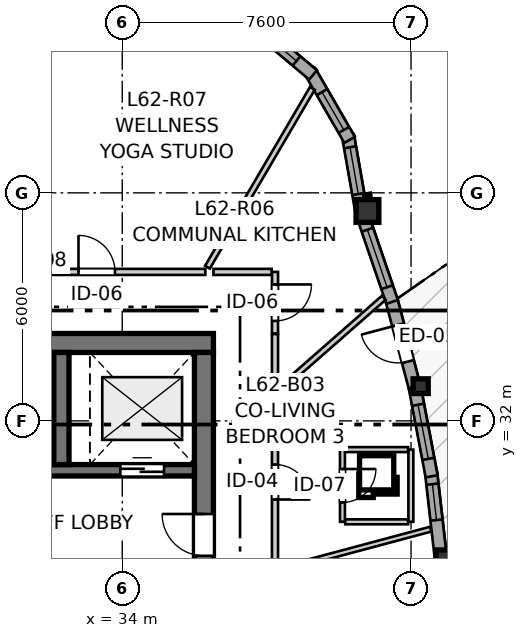
"""IFC4 building model, lengths in metres.
Left out: names, types, materials, properties, quantities, classifications, styles, units other than length and angle.
Written with IfcOpenShell. Run it as: python <this file> out.ifc"""

import sys

from ifc_helpers import new_model, si_unit, direction, frame, frame_2d, origin, origin_2d, place, context, subcontext, project, spatial, rectangle, i_section, extrude, source, transform, mapped, element, fill, save


model = new_model("IFC4")
c1 = context("Model", 3, precision=1e-05, world=origin(), true_north=direction((0.0, 1.0)))
c2 = subcontext(c1, "Body", "Model", "MODEL_VIEW")
j1 = project(units=[si_unit("LENGTHUNIT", "METRE"), si_unit("PLANEANGLEUNIT", "RADIAN")], contexts=[c1])
p1 = place(None, origin())
s1 = spatial("IfcSite", under=j1, at=p1, CompositionType="ELEMENT")
p2 = place(p1, origin())
s2 = spatial("IfcBuilding", under=s1, at=p2, CompositionType="ELEMENT")
p3 = place(p2, frame((0.0, 0.0, 208.4)))
s3 = spatial("IfcBuildingStorey", under=s2, at=p3, CompositionType="ELEMENT", Elevation=208.4)
p4 = place(p3, frame((36.4, 34.05, 0.0), z_axis=(0.0, 0.0, 1.0), x_axis=(-1.0, 0.0, 0.0)))
e1 = element("IfcWall", 1, at=p4, inside=s3, PredefinedType="SHEAR", context=c2, shape_type="SweptSolid", body=[
    extrude(rectangle(XDim=12.1, YDim=0.5, at=frame_2d((6.05, 0.0))), origin(), (0.0, 0.0, 1.0), 2.935),
])
p5 = place(p3, frame((36.15, 18.2, 0.0), z_axis=(0.0, 0.0, 1.0), x_axis=(0.0, 1.0, 0.0)))
e2 = element("IfcWall", 2, at=p5, inside=s3, PredefinedType="SHEAR", context=c2, shape_type="SweptSolid", body=[
    extrude(rectangle(XDim=15.6, YDim=0.5, at=frame_2d((7.8, 0.0))), origin(), (0.0, 0.0, 1.0), 2.935),
])
p6 = place(p5, frame((4.25, 0.0, 0.0)))
e3 = element("IfcOpeningElement", 3, at=p6, cuts=e2, PredefinedType="OPENING", context=c2, shape_type="SweptSolid", body=[
    extrude(rectangle(XDim=1.1, YDim=2.15, at=frame_2d((0.55, 1.075))), frame((0.0, 0.26, 0.0), z_axis=(0.0, -1.0, 0.0), x_axis=(1.0, 0.0, 0.0)), (0.0, 0.0, 1.0), 0.52),
])
p7 = place(p5, frame((10.25, 0.0, 0.0)))
e4 = element("IfcOpeningElement", 4, at=p7, cuts=e2, PredefinedType="OPENING", context=c2, shape_type="SweptSolid", body=[
    extrude(rectangle(XDim=1.1, YDim=2.15, at=frame_2d((0.55, 1.075))), frame((0.0, 0.26, 0.0), z_axis=(0.0, -1.0, 0.0), x_axis=(1.0, 0.0, 0.0)), (0.0, 0.0, 1.0), 0.52),
])
p8 = place(p3, frame((24.8, 30.7, 0.0), z_axis=(0.0, 0.0, 1.0), x_axis=(1.0, 0.0, 0.0)))
e5 = element("IfcWall", 5, at=p8, inside=s3, PredefinedType="SHEAR", context=c2, shape_type="SweptSolid", body=[
    extrude(rectangle(XDim=11.1, YDim=0.3, at=frame_2d((5.55, 0.0))), origin(), (0.0, 0.0, 1.0), 2.935),
])
p9 = place(p8, frame((6.22, 0.0, 0.0)))
e6 = element("IfcOpeningElement", 6, at=p9, cuts=e5, PredefinedType="OPENING", context=c2, shape_type="SweptSolid", body=[
    extrude(rectangle(XDim=0.98, YDim=2.15, at=frame_2d((0.49, 1.075))), frame((0.0, 0.16, 0.0), z_axis=(0.0, -1.0, 0.0), x_axis=(1.0, 0.0, 0.0)), (0.0, 0.0, 1.0), 0.32),
])
p10 = place(p8, frame((9.15, 0.0, 0.0)))
e7 = element("IfcOpeningElement", 7, at=p10, cuts=e5, PredefinedType="OPENING", context=c2, shape_type="SweptSolid", body=[
    extrude(rectangle(XDim=1.15, YDim=2.15, at=frame_2d((0.575, 1.075))), frame((0.0, 0.16, 0.0), z_axis=(0.0, -1.0, 0.0), x_axis=(1.0, 0.0, 0.0)), (0.0, 0.0, 1.0), 0.32),
])
p11 = place(p3, frame((32.4, 30.85, 0.0), z_axis=(0.0, 0.0, 1.0), x_axis=(0.0, 1.0, 0.0)))
e8 = element("IfcWall", 8, at=p11, inside=s3, PredefinedType="SHEAR", context=c2, shape_type="SweptSolid", body=[
    extrude(rectangle(XDim=2.95, YDim=0.4, at=frame_2d((1.475, 0.0))), origin(), (0.0, 0.0, 1.0), 2.935),
])
m1 = source(origin(), c2, "Body", "SweptSolid", [
    extrude(rectangle(XDim=0.6, YDim=0.6, at=origin_2d()), origin(), (0.0, 0.0, 1.0), 2.935),
])
p12 = place(p3, frame((42.554, 28.304, 0.0), z_axis=(0.0, 0.0, 1.0), x_axis=(1.0, 0.0, 0.0)))
e9 = element("IfcColumn", 9, at=p12, inside=s3, PredefinedType="COLUMN", context=c2, shape_type="MappedRepresentation", body=[
    mapped(m1, transform((0.0, 0.0, 0.0), x_axis=(1.0, 0.0, 0.0), y_axis=(0.0, 1.0, 0.0), z_axis=(0.0, 0.0, 1.0), scale=1.0)),
])
m2 = source(origin(), c2, "Body", "SweptSolid", [
    extrude(i_section(OverallWidth=0.398, OverallDepth=0.387, WebThickness=0.019, FlangeThickness=0.03, FilletRadius=0.015, at=origin_2d()), origin(), (0.0, 0.0, 1.0), 2.935),
])
p13 = place(p3, frame((41.854, 32.914, 0.0), z_axis=(0.0, 0.0, 1.0), x_axis=(1.0, 0.0, 0.0)))
e10 = element("IfcColumn", 10, at=p13, inside=s3, PredefinedType="PILASTER", context=c2, shape_type="MappedRepresentation", body=[
    mapped(m2, transform((0.0, 0.0, 0.0), x_axis=(1.0, 0.0, 0.0), y_axis=(0.0, 1.0, 0.0), z_axis=(0.0, 0.0, 1.0), scale=1.0)),
])
p14 = place(p3, frame((40.452, 37.522, 0.0), z_axis=(0.0, 0.0, 1.0), x_axis=(1.0, 0.0, 0.0)))
e11 = element("IfcColumn", 11, at=p14, inside=s3, PredefinedType="COLUMN", context=c2, shape_type="MappedRepresentation", body=[
    mapped(m1, transform((0.0, 0.0, 0.0), x_axis=(1.0, 0.0, 0.0), y_axis=(0.0, 1.0, 0.0), z_axis=(0.0, 0.0, 1.0), scale=1.0)),
])
p15 = place(p3, frame((42.385, 28.376, 0.0), z_axis=(0.0, 0.0, 1.0), x_axis=(-0.113267221285, 0.993564560853, 0.0)))
e12 = element("IfcWall", 12, at=p15, inside=s3, PredefinedType="SOLIDWALL", context=c2, shape_type="SweptSolid", body=[
    extrude(rectangle(XDim=2.268, YDim=0.32, at=frame_2d((1.134, 0.0))), origin(), (0.0, 0.0, 1.0), 2.555),
])
p16 = place(p15, frame((1.021, 0.0, 0.82)))
e13 = element("IfcOpeningElement", 13, at=p16, cuts=e12, PredefinedType="OPENING", context=c2, shape_type="SweptSolid", body=[
    extrude(rectangle(XDim=0.95, YDim=1.35, at=frame_2d((0.475, 0.675))), frame((0.0, 0.17, 0.0), z_axis=(0.0, -1.0, 0.0), x_axis=(1.0, 0.0, 0.0)), (0.0, 0.0, 1.0), 0.34),
])
p17 = place(p3, frame((42.141, 30.542, 0.0), z_axis=(0.0, 0.0, 1.0), x_axis=(-0.186632734065, 0.982429754525, 0.0)))
e14 = element("IfcWall", 14, at=p17, inside=s3, PredefinedType="SOLIDWALL", context=c2, shape_type="SweptSolid", body=[
    extrude(rectangle(XDim=2.364, YDim=0.32, at=frame_2d((1.182, 0.0))), origin(), (0.0, 0.0, 1.0), 2.555),
])
p18 = place(p17, frame((0.467, 0.0, 0.82)))
e15 = element("IfcOpeningElement", 15, at=p18, cuts=e14, PredefinedType="OPENING", context=c2, shape_type="SweptSolid", body=[
    extrude(rectangle(XDim=1.45, YDim=1.25, at=frame_2d((0.725, 0.625))), frame((0.0, 0.17, 0.0), z_axis=(0.0, -1.0, 0.0), x_axis=(1.0, 0.0, 0.0)), (0.0, 0.0, 1.0), 0.34),
])
p19 = place(p3, frame((41.694, 32.892, 0.0), z_axis=(0.0, 0.0, 1.0), x_axis=(-0.257068132003, 0.966393282007, 0.0)))
e16 = element("IfcWall", 16, at=p19, inside=s3, PredefinedType="SOLIDWALL", context=c2, shape_type="SweptSolid", body=[
    extrude(rectangle(XDim=2.403, YDim=0.32, at=frame_2d((1.201, 0.0))), origin(), (0.0, 0.0, 1.0), 2.555),
])
p20 = place(p19, frame((0.691, 0.0, 0.0)))
e17 = element("IfcOpeningElement", 17, at=p20, cuts=e16, PredefinedType="OPENING", context=c2, shape_type="SweptSolid", body=[
    extrude(rectangle(XDim=1.0, YDim=2.1, at=frame_2d((0.5, 1.05))), frame((0.0, 0.17, 0.0), z_axis=(0.0, -1.0, 0.0), x_axis=(1.0, 0.0, 0.0)), (0.0, 0.0, 1.0), 0.34),
])
p21 = place(p3, frame((41.102, 35.13, 0.0), z_axis=(0.0, 0.0, 1.0), x_axis=(-0.323685265908, 0.946164810503, 0.0)))
e18 = element("IfcWall", 18, at=p21, inside=s3, PredefinedType="SOLIDWALL", context=c2, shape_type="SweptSolid", body=[
    extrude(rectangle(XDim=2.384, YDim=0.32, at=frame_2d((1.192, 0.0))), origin(), (0.0, 0.0, 1.0), 2.555),
])
p22 = place(p21, frame((0.408, 0.0, 0.82)))
e19 = element("IfcOpeningElement", 19, at=p22, cuts=e18, PredefinedType="OPENING", context=c2, shape_type="SweptSolid", body=[
    extrude(rectangle(XDim=1.6, YDim=1.35, at=frame_2d((0.8, 0.675))), frame((0.0, 0.17, 0.0), z_axis=(0.0, -1.0, 0.0), x_axis=(1.0, 0.0, 0.0)), (0.0, 0.0, 1.0), 0.34),
])
p23 = place(p3, frame((40.279, 37.583, 0.0), z_axis=(0.0, 0.0, 1.0), x_axis=(-0.173671780312, 0.984803590937, 0.0)))
e20 = element("IfcWall", 20, at=p23, inside=s3, PredefinedType="SOLIDWALL", context=c2, shape_type="SweptSolid", body=[
    extrude(rectangle(XDim=1.962, YDim=0.32, at=frame_2d((0.981, 0.0))), origin(), (0.0, 0.0, 1.0), 2.555),
])
p24 = place(p23, frame((0.391, 0.0, 0.82)))
e21 = element("IfcOpeningElement", 21, at=p24, cuts=e20, PredefinedType="OPENING", context=c2, shape_type="SweptSolid", body=[
    extrude(rectangle(XDim=1.25, YDim=1.35, at=frame_2d((0.625, 0.675))), frame((0.0, 0.17, 0.0), z_axis=(0.0, -1.0, 0.0), x_axis=(1.0, 0.0, 0.0)), (0.0, 0.0, 1.0), 0.34),
])
p25 = place(p3, frame((39.983, 39.393, 0.0), z_axis=(0.0, 0.0, 1.0), x_axis=(-0.499995423472, 0.866028046028, 0.0)))
e22 = element("IfcWall", 22, at=p25, inside=s3, PredefinedType="SOLIDWALL", context=c2, shape_type="SweptSolid", body=[
    extrude(rectangle(XDim=2.09, YDim=0.32, at=frame_2d((1.045, 0.0))), origin(), (0.0, 0.0, 1.0), 2.555),
])
p26 = place(p25, frame((0.303, 0.0, 0.82)))
e23 = element("IfcOpeningElement", 23, at=p26, cuts=e22, PredefinedType="OPENING", context=c2, shape_type="SweptSolid", body=[
    extrude(rectangle(XDim=1.15, YDim=1.2, at=frame_2d((0.575, 0.6))), frame((0.0, 0.17, 0.0), z_axis=(0.0, -1.0, 0.0), x_axis=(1.0, 0.0, 0.0)), (0.0, 0.0, 1.0), 0.34),
])
p27 = place(p3, frame((39.022, 41.104, 0.0), z_axis=(0.0, 0.0, 1.0), x_axis=(-0.766072824549, 0.642753784499, 0.0)))
e24 = element("IfcWall", 24, at=p27, inside=s3, PredefinedType="SOLIDWALL", context=c2, shape_type="SweptSolid", body=[
    extrude(rectangle(XDim=2.091, YDim=0.32, at=frame_2d((1.045, 0.0))), origin(), (0.0, 0.0, 1.0), 2.555),
])
p28 = place(p27, frame((0.57, 0.0, 0.82)))
e25 = element("IfcOpeningElement", 25, at=p28, cuts=e24, PredefinedType="OPENING", context=c2, shape_type="SweptSolid", body=[
    extrude(rectangle(XDim=0.95, YDim=1.35, at=frame_2d((0.475, 0.675))), frame((0.0, 0.17, 0.0), z_axis=(0.0, -1.0, 0.0), x_axis=(1.0, 0.0, 0.0)), (0.0, 0.0, 1.0), 0.34),
])
p29 = place(p3, frame((30.474, 35.92, 0.0), z_axis=(0.0, 0.0, 1.0), x_axis=(1.0, 0.0, 0.0)))
e26 = element("IfcWall", 26, at=p29, inside=s3, PredefinedType="PARTITIONING", context=c2, shape_type="SweptSolid", body=[
    extrude(rectangle(XDim=5.713, YDim=0.16, at=frame_2d((2.856, 0.0))), origin(), (0.0, 0.0, 1.0), 2.935),
])
p30 = place(p29, frame((2.375, 0.0, 0.0)))
e27 = element("IfcOpeningElement", 27, at=p30, cuts=e26, PredefinedType="OPENING", context=c2, shape_type="SweptSolid", body=[
    extrude(rectangle(XDim=0.96, YDim=2.1, at=frame_2d((0.48, 1.05))), frame((0.0, 0.09, 0.0), z_axis=(0.0, -1.0, 0.0), x_axis=(1.0, 0.0, 0.0)), (0.0, 0.0, 1.0), 0.18),
])
p31 = place(p3, frame((38.02, 32.748, 0.0), z_axis=(0.0, 0.0, 1.0), x_axis=(0.0, -1.0, 0.0)))
e28 = element("IfcWall", 28, at=p31, inside=s3, PredefinedType="PARTITIONING", context=c2, shape_type="SweptSolid", body=[
    extrude(rectangle(XDim=4.71, YDim=0.16, at=frame_2d((2.355, 0.0))), origin(), (0.0, 0.0, 1.0), 2.603),
])
p32 = place(p31, frame((1.897, 0.0, 0.0)))
e29 = element("IfcOpeningElement", 29, at=p32, cuts=e28, PredefinedType="OPENING", context=c2, shape_type="SweptSolid", body=[
    extrude(rectangle(XDim=0.92, YDim=2.1, at=frame_2d((0.46, 1.05))), frame((0.0, 0.09, 0.0), z_axis=(0.0, -1.0, 0.0), x_axis=(1.0, 0.0, 0.0)), (0.0, 0.0, 1.0), 0.18),
])
p33 = place(p3, frame((39.795, 31.244, 0.0), z_axis=(0.0, 0.0, 1.0), x_axis=(0.0, -1.0, 0.0)))
e30 = element("IfcWall", 30, at=p33, inside=s3, PredefinedType="PARTITIONING", context=c2, shape_type="SweptSolid", body=[
    extrude(rectangle(XDim=1.9, YDim=0.13, at=frame_2d((0.95, 0.0))), origin(), (0.0, 0.0, 1.0), 2.573),
])
p34 = place(p33, frame((0.51, 0.0, 0.0)))
e31 = element("IfcOpeningElement", 31, at=p34, cuts=e30, PredefinedType="OPENING", context=c2, shape_type="SweptSolid", body=[
    extrude(rectangle(XDim=0.88, YDim=2.05, at=frame_2d((0.44, 1.025))), frame((0.0, 0.075, 0.0), z_axis=(0.0, -1.0, 0.0), x_axis=(1.0, 0.0, 0.0)), (0.0, 0.0, 1.0), 0.15),
])
p35 = place(p3, frame((38.02, 35.92, 0.0), z_axis=(0.0, 0.0, 1.0), x_axis=(0.0, -1.0, 0.0)))
e32 = element("IfcWall", 32, at=p35, inside=s3, PredefinedType="PARTITIONING", context=c2, shape_type="SweptSolid", body=[
    extrude(rectangle(XDim=1.62, YDim=0.16, at=frame_2d((0.81, 0.0))), origin(), (0.0, 0.0, 1.0), 2.603),
])
p36 = place(p35, frame((0.33, 0.0, 0.0)))
e33 = element("IfcOpeningElement", 33, at=p36, cuts=e32, PredefinedType="OPENING", context=c2, shape_type="SweptSolid", body=[
    extrude(rectangle(XDim=0.96, YDim=2.1, at=frame_2d((0.48, 1.05))), frame((0.0, 0.09, 0.0), z_axis=(0.0, -1.0, 0.0), x_axis=(1.0, 0.0, 0.0)), (0.0, 0.0, 1.0), 0.18),
])
p37 = place(p3, frame((36.242, 36.044, 0.0), z_axis=(0.0, 0.0, 1.0), x_axis=(0.50599508157, 0.862536362959, 0.0)))
e34 = element("IfcWall", 34, at=p37, inside=s3, PredefinedType="PARTITIONING", context=c2, shape_type="SweptSolid", body=[
    extrude(rectangle(XDim=5.456, YDim=0.145, at=frame_2d((2.728, 0.0))), origin(), (0.0, 0.0, 1.0), 2.935),
])
p38 = place(p3, frame((38.125, 28.082, 0.0), z_axis=(0.0, 0.0, 1.0), x_axis=(0.965997321458, 0.258552073934, 0.0)))
e35 = element("IfcWall", 35, at=p38, inside=s3, PredefinedType="PARTITIONING", context=c2, shape_type="SweptSolid", body=[
    extrude(rectangle(XDim=4.134, YDim=0.13, at=frame_2d((2.067, 0.0))), origin(), (0.0, 0.0, 1.0), 2.935),
])
p39 = place(p3, frame((38.154, 32.845, 0.0), z_axis=(0.0, 0.0, 1.0), x_axis=(0.751793032372, 0.659399148071, 0.0)))
e36 = element("IfcWall", 36, at=p39, inside=s3, PredefinedType="PARTITIONING", context=c2, shape_type="SweptSolid", body=[
    extrude(rectangle(XDim=3.631, YDim=0.145, at=frame_2d((1.815, 0.0))), origin(), (0.0, 0.0, 1.0), 2.935),
])
p40 = place(p3, frame((41.595, 29.344, 0.0), z_axis=(0.0, 0.0, 1.0), x_axis=(0.0, 1.0, 0.0)))
e37 = element("IfcWall", 37, at=p40, inside=s3, PredefinedType="PARTITIONING", context=c2, shape_type="SweptSolid", body=[
    extrude(rectangle(XDim=1.9, YDim=0.13, at=frame_2d((0.95, 0.0))), origin(), (0.0, 0.0, 1.0), 2.935),
])
for number, where, z_axis, x_axis in (
    (38, (39.868, 31.244, 0.0), (0.0, 0.0, 1.0), (1.0, 0.0, 0.0)),
    (39, (39.868, 29.344, 0.0), (0.0, 0.0, 1.0), (1.0, 0.0, 0.0)),
):
    element("IfcWall", number, at=place(p3, frame(where, z_axis=z_axis, x_axis=x_axis)), inside=s3, PredefinedType="PARTITIONING", context=c2, shape_type="SweptSolid", body=[
        extrude(rectangle(XDim=1.654, YDim=0.13, at=frame_2d((0.827, 0.0))), origin(), (0.0, 0.0, 1.0), 2.935),
    ])
p41 = place(p3, frame((36.4, 35.92, 0.0), z_axis=(0.0, 0.0, 1.0), x_axis=(1.0, 0.0, 0.0)))
e40 = element("IfcWall", 40, at=p41, inside=s3, PredefinedType="PARTITIONING", context=c2, shape_type="SweptSolid", body=[
    extrude(rectangle(XDim=1.532, YDim=0.16, at=frame_2d((0.766, 0.0))), origin(), (0.0, 0.0, 1.0), 2.935),
])
p42 = place(p3, frame((38.02, 32.938, 0.0), z_axis=(0.0, 0.0, 1.0), x_axis=(0.0, 1.0, 0.0)))
e41 = element("IfcWall", 41, at=p42, inside=s3, PredefinedType="PARTITIONING", context=c2, shape_type="SweptSolid", body=[
    extrude(rectangle(XDim=1.347, YDim=0.16, at=frame_2d((0.674, 0.0))), origin(), (0.0, 0.0, 1.0), 2.603),
])
m3 = source(origin(), c2, "Body", "SweptSolid", [
    extrude(rectangle(XDim=0.95, YDim=1.35, at=frame_2d((0.475, 0.675))), frame((0.0, 0.03, 0.0), z_axis=(0.0, -1.0, 0.0), x_axis=(1.0, 0.0, 0.0)), (0.0, 0.0, 1.0), 0.06),
])
p43 = place(p16, origin())
e42 = element("IfcWindow", 42, at=p43, inside=s3, PartitioningType="SINGLE_PANEL", PredefinedType="WINDOW", context=c2, shape_type="MappedRepresentation", body=[
    mapped(m3, transform((0.0, 0.0, 0.0), x_axis=(1.0, 0.0, 0.0), y_axis=(0.0, 1.0, 0.0), z_axis=(0.0, 0.0, 1.0), scale=1.0)),
])
fill(e13, e42)
m4 = source(origin(), c2, "Body", "SweptSolid", [
    extrude(rectangle(XDim=1.45, YDim=1.25, at=frame_2d((0.725, 0.625))), frame((0.0, 0.03, 0.0), z_axis=(0.0, -1.0, 0.0), x_axis=(1.0, 0.0, 0.0)), (0.0, 0.0, 1.0), 0.06),
])
p44 = place(p18, origin())
e43 = element("IfcWindow", 43, at=p44, inside=s3, PartitioningType="SINGLE_PANEL", PredefinedType="WINDOW", context=c2, shape_type="MappedRepresentation", body=[
    mapped(m4, transform((0.0, 0.0, 0.0), x_axis=(1.0, 0.0, 0.0), y_axis=(0.0, 1.0, 0.0), z_axis=(0.0, 0.0, 1.0), scale=1.0)),
])
fill(e15, e43)
m5 = source(origin(), c2, "Body", "SweptSolid", [
    extrude(rectangle(XDim=1.0, YDim=2.1, at=frame_2d((0.5, 1.05))), frame((0.0, 0.025, 0.0), z_axis=(0.0, -1.0, 0.0), x_axis=(1.0, 0.0, 0.0)), (0.0, 0.0, 1.0), 0.05),
])
p45 = place(p20, origin())
e44 = element("IfcDoor", 44, at=p45, inside=s3, OperationType="SINGLE_SWING_RIGHT", PredefinedType="DOOR", context=c2, shape_type="MappedRepresentation", body=[
    mapped(m5, transform((0.0, 0.0, 0.0), x_axis=(1.0, 0.0, 0.0), y_axis=(0.0, 1.0, 0.0), z_axis=(0.0, 0.0, 1.0), scale=1.0)),
])
fill(e17, e44)
m6 = source(origin(), c2, "Body", "SweptSolid", [
    extrude(rectangle(XDim=1.6, YDim=1.35, at=frame_2d((0.8, 0.675))), frame((0.0, 0.03, 0.0), z_axis=(0.0, -1.0, 0.0), x_axis=(1.0, 0.0, 0.0)), (0.0, 0.0, 1.0), 0.06),
])
p46 = place(p22, origin())
e45 = element("IfcWindow", 45, at=p46, inside=s3, PartitioningType="SINGLE_PANEL", PredefinedType="WINDOW", context=c2, shape_type="MappedRepresentation", body=[
    mapped(m6, transform((0.0, 0.0, 0.0), x_axis=(1.0, 0.0, 0.0), y_axis=(0.0, 1.0, 0.0), z_axis=(0.0, 0.0, 1.0), scale=1.0)),
])
fill(e19, e45)
m7 = source(origin(), c2, "Body", "SweptSolid", [
    extrude(rectangle(XDim=1.25, YDim=1.35, at=frame_2d((0.625, 0.675))), frame((0.0, 0.03, 0.0), z_axis=(0.0, -1.0, 0.0), x_axis=(1.0, 0.0, 0.0)), (0.0, 0.0, 1.0), 0.06),
])
p47 = place(p24, origin())
e46 = element("IfcWindow", 46, at=p47, inside=s3, PartitioningType="SINGLE_PANEL", PredefinedType="WINDOW", context=c2, shape_type="MappedRepresentation", body=[
    mapped(m7, transform((0.0, 0.0, 0.0), x_axis=(1.0, 0.0, 0.0), y_axis=(0.0, 1.0, 0.0), z_axis=(0.0, 0.0, 1.0), scale=1.0)),
])
fill(e21, e46)
m8 = source(origin(), c2, "Body", "SweptSolid", [
    extrude(rectangle(XDim=1.15, YDim=1.2, at=frame_2d((0.575, 0.6))), frame((0.0, 0.03, 0.0), z_axis=(0.0, -1.0, 0.0), x_axis=(1.0, 0.0, 0.0)), (0.0, 0.0, 1.0), 0.06),
])
p48 = place(p26, origin())
e47 = element("IfcWindow", 47, at=p48, inside=s3, PartitioningType="SINGLE_PANEL", PredefinedType="WINDOW", context=c2, shape_type="MappedRepresentation", body=[
    mapped(m8, transform((0.0, 0.0, 0.0), x_axis=(1.0, 0.0, 0.0), y_axis=(0.0, 1.0, 0.0), z_axis=(0.0, 0.0, 1.0), scale=1.0)),
])
fill(e23, e47)
p49 = place(p28, origin())
e48 = element("IfcWindow", 48, at=p49, inside=s3, PartitioningType="SINGLE_PANEL", PredefinedType="WINDOW", context=c2, shape_type="MappedRepresentation", body=[
    mapped(m3, transform((0.0, 0.0, 0.0), x_axis=(1.0, 0.0, 0.0), y_axis=(0.0, 1.0, 0.0), z_axis=(0.0, 0.0, 1.0), scale=1.0)),
])
fill(e25, e48)
m9 = source(origin(), c2, "Body", "SweptSolid", [
    extrude(rectangle(XDim=1.15, YDim=2.15, at=frame_2d((0.575, 1.075))), frame((0.0, 0.025, 0.0), z_axis=(0.0, -1.0, 0.0), x_axis=(1.0, 0.0, 0.0)), (0.0, 0.0, 1.0), 0.05),
])
p50 = place(p10, origin())
e49 = element("IfcDoor", 49, at=p50, inside=s3, OperationType="DOUBLE_DOOR_SLIDING", PredefinedType="DOOR", context=c2, shape_type="MappedRepresentation", body=[
    mapped(m9, transform((0.0, 0.0, 0.0), x_axis=(1.0, 0.0, 0.0), y_axis=(0.0, 1.0, 0.0), z_axis=(0.0, 0.0, 1.0), scale=1.0)),
])
fill(e7, e49)
m10 = source(origin(), c2, "Body", "SweptSolid", [
    extrude(rectangle(XDim=1.1, YDim=2.15, at=frame_2d((0.55, 1.075))), frame((0.0, 0.025, 0.0), z_axis=(0.0, -1.0, 0.0), x_axis=(1.0, 0.0, 0.0)), (0.0, 0.0, 1.0), 0.05),
])
p51 = place(p7, origin())
e50 = element("IfcDoor", 50, at=p51, inside=s3, OperationType="SINGLE_SWING_RIGHT", PredefinedType="DOOR", context=c2, shape_type="MappedRepresentation", body=[
    mapped(m10, transform((0.0, 0.0, 0.0), x_axis=(1.0, 0.0, 0.0), y_axis=(0.0, 1.0, 0.0), z_axis=(0.0, 0.0, 1.0), scale=1.0)),
])
fill(e4, e50)
m11 = source(origin(), c2, "Body", "SweptSolid", [
    extrude(rectangle(XDim=0.96, YDim=2.1, at=frame_2d((0.48, 1.05))), frame((0.0, 0.025, 0.0), z_axis=(0.0, -1.0, 0.0), x_axis=(1.0, 0.0, 0.0)), (0.0, 0.0, 1.0), 0.05),
])
p52 = place(p30, origin())
e51 = element("IfcDoor", 51, at=p52, inside=s3, OperationType="SINGLE_SWING_LEFT", PredefinedType="DOOR", context=c2, shape_type="MappedRepresentation", body=[
    mapped(m11, transform((0.0, 0.0, 0.0), x_axis=(1.0, 0.0, 0.0), y_axis=(0.0, 1.0, 0.0), z_axis=(0.0, 0.0, 1.0), scale=1.0)),
])
fill(e27, e51)
m12 = source(origin(), c2, "Body", "SweptSolid", [
    extrude(rectangle(XDim=0.92, YDim=2.1, at=frame_2d((0.46, 1.05))), frame((0.0, 0.025, 0.0), z_axis=(0.0, -1.0, 0.0), x_axis=(1.0, 0.0, 0.0)), (0.0, 0.0, 1.0), 0.05),
])
p53 = place(p32, origin())
e52 = element("IfcDoor", 52, at=p53, inside=s3, OperationType="SINGLE_SWING_RIGHT", PredefinedType="DOOR", context=c2, shape_type="MappedRepresentation", body=[
    mapped(m12, transform((0.0, 0.0, 0.0), x_axis=(1.0, 0.0, 0.0), y_axis=(0.0, 1.0, 0.0), z_axis=(0.0, 0.0, 1.0), scale=1.0)),
])
fill(e29, e52)
m13 = source(origin(), c2, "Body", "SweptSolid", [
    extrude(rectangle(XDim=0.88, YDim=2.05, at=frame_2d((0.44, 1.025))), frame((0.0, 0.025, 0.0), z_axis=(0.0, -1.0, 0.0), x_axis=(1.0, 0.0, 0.0)), (0.0, 0.0, 1.0), 0.05),
])
p54 = place(p34, origin())
e53 = element("IfcDoor", 53, at=p54, inside=s3, OperationType="SINGLE_SWING_LEFT", PredefinedType="DOOR", context=c2, shape_type="MappedRepresentation", body=[
    mapped(m13, transform((0.0, 0.0, 0.0), x_axis=(1.0, 0.0, 0.0), y_axis=(0.0, 1.0, 0.0), z_axis=(0.0, 0.0, 1.0), scale=1.0)),
])
fill(e31, e53)
p55 = place(p36, origin())
e54 = element("IfcDoor", 54, at=p55, inside=s3, OperationType="SINGLE_SWING_LEFT", PredefinedType="DOOR", context=c2, shape_type="MappedRepresentation", body=[
    mapped(m11, transform((0.0, 0.0, 0.0), x_axis=(1.0, 0.0, 0.0), y_axis=(0.0, 1.0, 0.0), z_axis=(0.0, 0.0, 1.0), scale=1.0)),
])
fill(e33, e54)
save(model, sys.argv[1])
